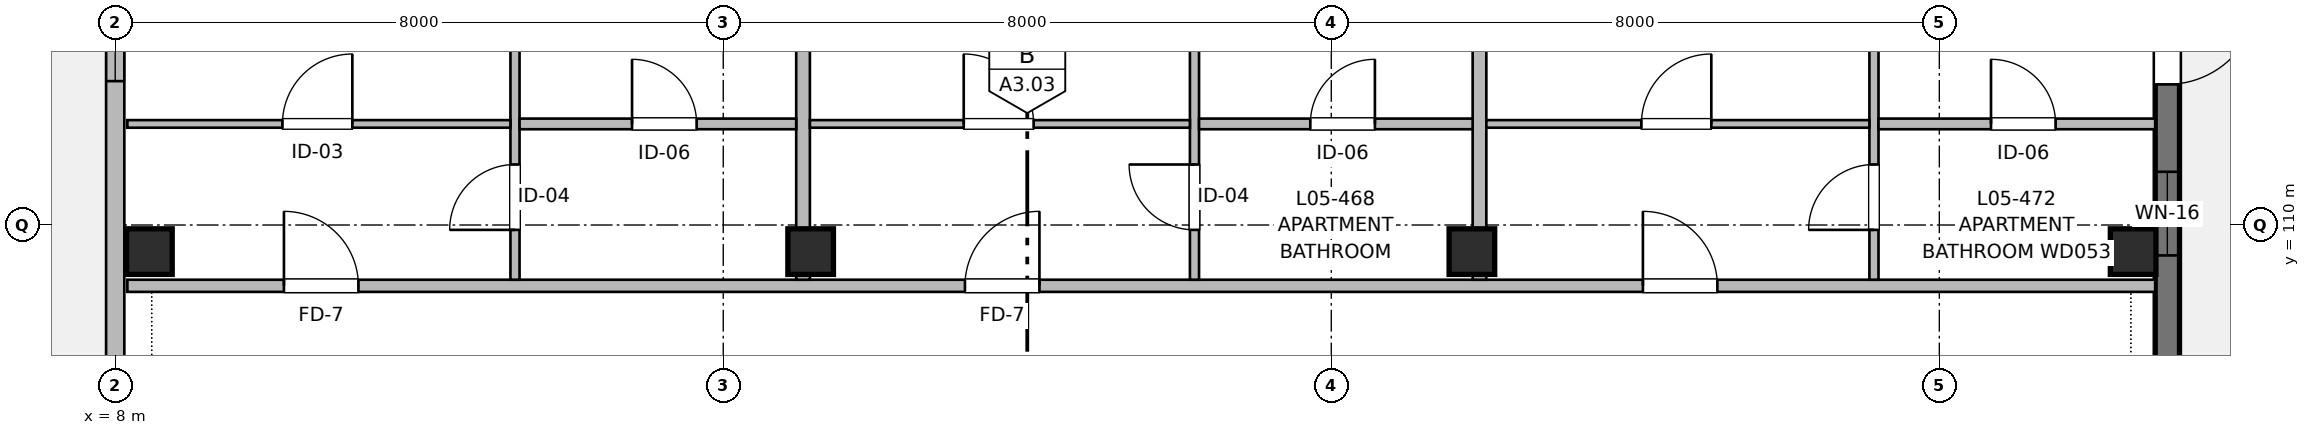
"""IFC4 building model, lengths in metres.
Left out: names, types, materials, properties, quantities, classifications, styles, units other than length and angle.
Written with IfcOpenShell. Run it as: python <this file> out.ifc"""

import sys

from ifc_helpers import new_model, si_unit, direction, frame, frame_2d, origin, origin_2d, place, context, subcontext, project, spatial, rectangle, extrude, element, fill, save


model = new_model("IFC4")
c1 = context("Model", 3, precision=1e-05, world=origin(), true_north=direction((0.0, 1.0)))
c2 = subcontext(c1, "Body", "Model", "MODEL_VIEW")
j1 = project(units=[si_unit("LENGTHUNIT", "METRE"), si_unit("PLANEANGLEUNIT", "RADIAN")], contexts=[c1])
p1 = place(None, origin())
s1 = spatial("IfcSite", under=j1, at=p1, CompositionType="ELEMENT")
p2 = place(p1, origin())
s2 = spatial("IfcBuilding", under=s1, at=p2, CompositionType="ELEMENT")
p3 = place(p2, frame((0.0, 0.0, 16.96)))
s3 = spatial("IfcBuildingStorey", under=s2, at=p3, CompositionType="ELEMENT", Elevation=16.96)
for number, where, z_axis, x_axis in (
    (1, (8.45, 109.65, 0.0), (0.0, 0.0, 1.0), (1.0, 0.0, 0.0)),
    (2, (17.15, 109.65, 0.0), (0.0, 0.0, 1.0), (1.0, 0.0, 0.0)),
    (3, (25.85, 109.65, 0.0), (0.0, 0.0, 1.0), (1.0, 0.0, 0.0)),
    (4, (34.55, 109.65, 0.0), (0.0, 0.0, 1.0), (1.0, 0.0, 0.0)),
):
    element("IfcColumn", number, at=place(p3, frame(where, z_axis=z_axis, x_axis=x_axis)), inside=s3, PredefinedType="COLUMN", context=c2, shape_type="SweptSolid", body=[
        extrude(rectangle(XDim=0.6, YDim=0.6, at=origin_2d()), origin(), (0.0, 0.0, 1.0), 3.2),
    ])
p4 = place(p3, frame((35.0, 116.0, 0.0), z_axis=(0.0, 0.0, 1.0), x_axis=(0.0, -1.0, 0.0)))
e5 = element("IfcWall", 5, at=p4, inside=s3, PredefinedType="SHEAR", context=c2, shape_type="SweptSolid", body=[
    extrude(rectangle(XDim=16.0, YDim=0.32, at=frame_2d((8.0, 0.0))), origin(), (0.0, 0.0, 1.0), 2.98),
])
p5 = place(p4, frame((2.95, 0.0, 0.0)))
e6 = element("IfcOpeningElement", 6, at=p5, cuts=e5, PredefinedType="OPENING", context=c2, shape_type="SweptSolid", body=[
    extrude(rectangle(XDim=1.2, YDim=2.2, at=frame_2d((0.6, 1.1))), frame((0.0, 0.17, 0.0), z_axis=(0.0, -1.0, 0.0), x_axis=(1.0, 0.0, 0.0)), (0.0, 0.0, 1.0), 0.34),
])
p6 = place(p4, frame((5.3, 0.0, 0.62)))
e7 = element("IfcOpeningElement", 7, at=p6, cuts=e5, PredefinedType="OPENING", context=c2, shape_type="SweptSolid", body=[
    extrude(rectangle(XDim=1.1, YDim=1.6, at=frame_2d((0.55, 0.8))), frame((0.0, 0.17, 0.0), z_axis=(0.0, -1.0, 0.0), x_axis=(1.0, 0.0, 0.0)), (0.0, 0.0, 1.0), 0.34),
])
p7 = place(p4, frame((10.875, 0.0, 0.72)))
e8 = element("IfcOpeningElement", 8, at=p7, cuts=e5, PredefinedType="OPENING", context=c2, shape_type="SweptSolid", body=[
    extrude(rectangle(XDim=2.25, YDim=1.5, at=frame_2d((1.125, 0.75))), frame((0.0, 0.17, 0.0), z_axis=(0.0, -1.0, 0.0), x_axis=(1.0, 0.0, 0.0)), (0.0, 0.0, 1.0), 0.34),
])
p8 = place(p3, frame((8.0, 59.2, 0.0), z_axis=(0.0, 0.0, 1.0), x_axis=(0.0, 1.0, 0.0)))
e9 = element("IfcWall", 9, at=p8, inside=s3, PredefinedType="SOLIDWALL", context=c2, shape_type="SweptSolid", body=[
    extrude(rectangle(XDim=56.8, YDim=0.24, at=frame_2d((28.4, 0.0))), origin(), (0.0, 0.0, 1.0), 2.98),
])
p9 = place(p8, frame((2.657, 0.0, 0.0)))
e10 = element("IfcOpeningElement", 10, at=p9, cuts=e9, PredefinedType="OPENING", context=c2, shape_type="SweptSolid", body=[
    extrude(rectangle(XDim=1.2, YDim=2.2, at=frame_2d((0.6, 1.1))), frame((0.0, 0.13, 0.0), z_axis=(0.0, -1.0, 0.0), x_axis=(1.0, 0.0, 0.0)), (0.0, 0.0, 1.0), 0.26),
])
p10 = place(p8, frame((5.357, 0.0, 0.62)))
e11 = element("IfcOpeningElement", 11, at=p10, cuts=e9, PredefinedType="OPENING", context=c2, shape_type="SweptSolid", body=[
    extrude(rectangle(XDim=1.1, YDim=1.6, at=frame_2d((0.55, 0.8))), frame((0.0, 0.13, 0.0), z_axis=(0.0, -1.0, 0.0), x_axis=(1.0, 0.0, 0.0)), (0.0, 0.0, 1.0), 0.26),
])
p11 = place(p8, frame((11.046, 0.0, 0.72)))
e12 = element("IfcOpeningElement", 12, at=p11, cuts=e9, PredefinedType="OPENING", context=c2, shape_type="SweptSolid", body=[
    extrude(rectangle(XDim=2.25, YDim=1.5, at=frame_2d((1.125, 0.75))), frame((0.0, 0.13, 0.0), z_axis=(0.0, -1.0, 0.0), x_axis=(1.0, 0.0, 0.0)), (0.0, 0.0, 1.0), 0.26),
])
p12 = place(p8, frame((19.311, 0.0, 0.9)))
e13 = element("IfcOpeningElement", 13, at=p12, cuts=e9, PredefinedType="OPENING", context=c2, shape_type="SweptSolid", body=[
    extrude(rectangle(XDim=1.05, YDim=1.15, at=frame_2d((0.525, 0.575))), frame((0.0, 0.13, 0.0), z_axis=(0.0, -1.0, 0.0), x_axis=(1.0, 0.0, 0.0)), (0.0, 0.0, 1.0), 0.26),
])
p13 = place(p8, frame((27.8, 0.0, 0.9)))
e14 = element("IfcOpeningElement", 14, at=p13, cuts=e9, PredefinedType="OPENING", context=c2, shape_type="SweptSolid", body=[
    extrude(rectangle(XDim=1.2, YDim=1.05, at=frame_2d((0.6, 0.525))), frame((0.0, 0.13, 0.0), z_axis=(0.0, -1.0, 0.0), x_axis=(1.0, 0.0, 0.0)), (0.0, 0.0, 1.0), 0.26),
])
p14 = place(p8, frame((36.189, 0.0, 0.9)))
e15 = element("IfcOpeningElement", 15, at=p14, cuts=e9, PredefinedType="OPENING", context=c2, shape_type="SweptSolid", body=[
    extrude(rectangle(XDim=0.65, YDim=0.95, at=frame_2d((0.325, 0.475))), frame((0.0, 0.13, 0.0), z_axis=(0.0, -1.0, 0.0), x_axis=(1.0, 0.0, 0.0)), (0.0, 0.0, 1.0), 0.26),
])
p15 = place(p8, frame((43.629, 0.0, 0.62)))
e16 = element("IfcOpeningElement", 16, at=p15, cuts=e9, PredefinedType="OPENING", context=c2, shape_type="SweptSolid", body=[
    extrude(rectangle(XDim=1.1, YDim=1.6, at=frame_2d((0.55, 0.8))), frame((0.0, 0.13, 0.0), z_axis=(0.0, -1.0, 0.0), x_axis=(1.0, 0.0, 0.0)), (0.0, 0.0, 1.0), 0.26),
])
p16 = place(p8, frame((52.693, 0.0, 0.47)))
e17 = element("IfcOpeningElement", 17, at=p16, cuts=e9, PredefinedType="OPENING", context=c2, shape_type="SweptSolid", body=[
    extrude(rectangle(XDim=2.7, YDim=1.75, at=frame_2d((1.35, 0.875))), frame((0.0, 0.13, 0.0), z_axis=(0.0, -1.0, 0.0), x_axis=(1.0, 0.0, 0.0)), (0.0, 0.0, 1.0), 0.26),
])
p17 = place(p3, frame((8.16, 109.2, 0.0), z_axis=(0.0, 0.0, 1.0), x_axis=(1.0, 0.0, 0.0)))
e18 = element("IfcWall", 18, at=p17, inside=s3, PredefinedType="PARTITIONING", context=c2, shape_type="SweptSolid", body=[
    extrude(rectangle(XDim=26.68, YDim=0.16, at=frame_2d((13.34, 0.0))), origin(), (0.0, 0.0, 1.0), 2.935),
])
p18 = place(p17, frame((2.06, 0.0, 0.0)))
e19 = element("IfcOpeningElement", 19, at=p18, cuts=e18, PredefinedType="OPENING", context=c2, shape_type="SweptSolid", body=[
    extrude(rectangle(XDim=0.98, YDim=2.15, at=frame_2d((0.49, 1.075))), frame((0.0, 0.09, 0.0), z_axis=(0.0, -1.0, 0.0), x_axis=(1.0, 0.0, 0.0)), (0.0, 0.0, 1.0), 0.18),
])
p19 = place(p17, frame((11.02, 0.0, 0.0)))
e20 = element("IfcOpeningElement", 20, at=p19, cuts=e18, PredefinedType="OPENING", context=c2, shape_type="SweptSolid", body=[
    extrude(rectangle(XDim=0.98, YDim=2.15, at=frame_2d((0.49, 1.075))), frame((0.0, 0.09, 0.0), z_axis=(0.0, -1.0, 0.0), x_axis=(1.0, 0.0, 0.0)), (0.0, 0.0, 1.0), 0.18),
])
p20 = place(p17, frame((19.94, 0.0, 0.0)))
e21 = element("IfcOpeningElement", 21, at=p20, cuts=e18, PredefinedType="OPENING", context=c2, shape_type="SweptSolid", body=[
    extrude(rectangle(XDim=0.98, YDim=2.15, at=frame_2d((0.49, 1.075))), frame((0.0, 0.09, 0.0), z_axis=(0.0, -1.0, 0.0), x_axis=(1.0, 0.0, 0.0)), (0.0, 0.0, 1.0), 0.18),
])
for number, where, z_axis, x_axis in (
    (22, (17.05, 109.28, 0.0), (0.0, 0.0, 1.0), (0.0, 1.0, 0.0)),
    (23, (25.95, 109.28, 0.0), (0.0, 0.0, 1.0), (0.0, 1.0, 0.0)),
):
    element("IfcWall", number, at=place(p3, frame(where, z_axis=z_axis, x_axis=x_axis)), inside=s3, PredefinedType="PARTITIONING", context=c2, shape_type="SweptSolid", body=[
        extrude(rectangle(XDim=6.6, YDim=0.18, at=frame_2d((3.3, 0.0))), origin(), (0.0, 0.0, 1.0), 2.68),
    ])
p21 = place(p3, frame((13.26, 109.28, 0.0), z_axis=(0.0, 0.0, 1.0), x_axis=(0.0, 1.0, 0.0)))
e24 = element("IfcWall", 24, at=p21, inside=s3, PredefinedType="PARTITIONING", context=c2, shape_type="SweptSolid", body=[
    extrude(rectangle(XDim=6.6, YDim=0.12, at=frame_2d((3.3, 0.0))), origin(), (0.0, 0.0, 1.0), 2.935),
])
p22 = place(p21, frame((0.656, 0.0, 0.0)))
e25 = element("IfcOpeningElement", 25, at=p22, cuts=e24, PredefinedType="OPENING", context=c2, shape_type="SweptSolid", body=[
    extrude(rectangle(XDim=0.86, YDim=2.1, at=frame_2d((0.43, 1.05))), frame((0.0, 0.07, 0.0), z_axis=(0.0, -1.0, 0.0), x_axis=(1.0, 0.0, 0.0)), (0.0, 0.0, 1.0), 0.14),
])
p23 = place(p21, frame((4.097, 0.0, 0.0)))
e26 = element("IfcOpeningElement", 26, at=p23, cuts=e24, PredefinedType="OPENING", context=c2, shape_type="SweptSolid", body=[
    extrude(rectangle(XDim=0.9, YDim=2.1, at=frame_2d((0.45, 1.05))), frame((0.0, 0.07, 0.0), z_axis=(0.0, -1.0, 0.0), x_axis=(1.0, 0.0, 0.0)), (0.0, 0.0, 1.0), 0.14),
])
p24 = place(p3, frame((13.32, 111.33, 0.0), z_axis=(0.0, 0.0, 1.0), x_axis=(1.0, 0.0, 0.0)))
e27 = element("IfcWall", 27, at=p24, inside=s3, PredefinedType="PARTITIONING", context=c2, shape_type="SweptSolid", body=[
    extrude(rectangle(XDim=3.64, YDim=0.14, at=frame_2d((1.82, 0.0))), origin(), (0.0, 0.0, 1.0), 2.935),
])
p25 = place(p24, frame((1.48, 0.0, 0.0)))
e28 = element("IfcOpeningElement", 28, at=p25, cuts=e27, PredefinedType="OPENING", context=c2, shape_type="SweptSolid", body=[
    extrude(rectangle(XDim=0.85, YDim=2.05, at=frame_2d((0.425, 1.025))), frame((0.0, 0.08, 0.0), z_axis=(0.0, -1.0, 0.0), x_axis=(1.0, 0.0, 0.0)), (0.0, 0.0, 1.0), 0.16),
])
p26 = place(p3, frame((8.16, 111.33, 0.0), z_axis=(0.0, 0.0, 1.0), x_axis=(1.0, 0.0, 0.0)))
e29 = element("IfcWall", 29, at=p26, inside=s3, PredefinedType="PARTITIONING", context=c2, shape_type="SweptSolid", body=[
    extrude(rectangle(XDim=5.04, YDim=0.1, at=frame_2d((2.52, 0.0))), origin(), (0.0, 0.0, 1.0), 2.935),
])
p27 = place(p26, frame((2.04, 0.0, 0.0)))
e30 = element("IfcOpeningElement", 30, at=p27, cuts=e29, PredefinedType="OPENING", context=c2, shape_type="SweptSolid", body=[
    extrude(rectangle(XDim=0.92, YDim=2.1, at=frame_2d((0.46, 1.05))), frame((0.0, 0.06, 0.0), z_axis=(0.0, -1.0, 0.0), x_axis=(1.0, 0.0, 0.0)), (0.0, 0.0, 1.0), 0.12),
])
p28 = place(p3, frame((22.2, 109.28, 0.0), z_axis=(0.0, 0.0, 1.0), x_axis=(0.0, 1.0, 0.0)))
e31 = element("IfcWall", 31, at=p28, inside=s3, PredefinedType="PARTITIONING", context=c2, shape_type="SweptSolid", body=[
    extrude(rectangle(XDim=6.6, YDim=0.12, at=frame_2d((3.3, 0.0))), origin(), (0.0, 0.0, 1.0), 2.935),
])
p29 = place(p28, frame((0.656, 0.0, 0.0)))
e32 = element("IfcOpeningElement", 32, at=p29, cuts=e31, PredefinedType="OPENING", context=c2, shape_type="SweptSolid", body=[
    extrude(rectangle(XDim=0.86, YDim=2.1, at=frame_2d((0.43, 1.05))), frame((0.0, 0.07, 0.0), z_axis=(0.0, -1.0, 0.0), x_axis=(1.0, 0.0, 0.0)), (0.0, 0.0, 1.0), 0.14),
])
p30 = place(p28, frame((4.097, 0.0, 0.0)))
e33 = element("IfcOpeningElement", 33, at=p30, cuts=e31, PredefinedType="OPENING", context=c2, shape_type="SweptSolid", body=[
    extrude(rectangle(XDim=0.9, YDim=2.1, at=frame_2d((0.45, 1.05))), frame((0.0, 0.07, 0.0), z_axis=(0.0, -1.0, 0.0), x_axis=(1.0, 0.0, 0.0)), (0.0, 0.0, 1.0), 0.14),
])
p31 = place(p3, frame((22.26, 111.33, 0.0), z_axis=(0.0, 0.0, 1.0), x_axis=(1.0, 0.0, 0.0)))
e34 = element("IfcWall", 34, at=p31, inside=s3, PredefinedType="PARTITIONING", context=c2, shape_type="SweptSolid", body=[
    extrude(rectangle(XDim=3.6, YDim=0.14, at=frame_2d((1.8, 0.0))), origin(), (0.0, 0.0, 1.0), 2.935),
])
p32 = place(p31, frame((1.464, 0.0, 0.0)))
e35 = element("IfcOpeningElement", 35, at=p32, cuts=e34, PredefinedType="OPENING", context=c2, shape_type="SweptSolid", body=[
    extrude(rectangle(XDim=0.85, YDim=2.05, at=frame_2d((0.425, 1.025))), frame((0.0, 0.08, 0.0), z_axis=(0.0, -1.0, 0.0), x_axis=(1.0, 0.0, 0.0)), (0.0, 0.0, 1.0), 0.16),
])
p33 = place(p3, frame((17.14, 111.33, 0.0), z_axis=(0.0, 0.0, 1.0), x_axis=(1.0, 0.0, 0.0)))
e36 = element("IfcWall", 36, at=p33, inside=s3, PredefinedType="PARTITIONING", context=c2, shape_type="SweptSolid", body=[
    extrude(rectangle(XDim=5.0, YDim=0.1, at=frame_2d((2.5, 0.0))), origin(), (0.0, 0.0, 1.0), 2.935),
])
p34 = place(p33, frame((2.024, 0.0, 0.0)))
e37 = element("IfcOpeningElement", 37, at=p34, cuts=e36, PredefinedType="OPENING", context=c2, shape_type="SweptSolid", body=[
    extrude(rectangle(XDim=0.92, YDim=2.1, at=frame_2d((0.46, 1.05))), frame((0.0, 0.06, 0.0), z_axis=(0.0, -1.0, 0.0), x_axis=(1.0, 0.0, 0.0)), (0.0, 0.0, 1.0), 0.12),
])
p35 = place(p3, frame((31.14, 109.28, 0.0), z_axis=(0.0, 0.0, 1.0), x_axis=(0.0, 1.0, 0.0)))
e38 = element("IfcWall", 38, at=p35, inside=s3, PredefinedType="PARTITIONING", context=c2, shape_type="SweptSolid", body=[
    extrude(rectangle(XDim=6.6, YDim=0.12, at=frame_2d((3.3, 0.0))), origin(), (0.0, 0.0, 1.0), 2.935),
])
p36 = place(p35, frame((0.656, 0.0, 0.0)))
e39 = element("IfcOpeningElement", 39, at=p36, cuts=e38, PredefinedType="OPENING", context=c2, shape_type="SweptSolid", body=[
    extrude(rectangle(XDim=0.86, YDim=2.1, at=frame_2d((0.43, 1.05))), frame((0.0, 0.07, 0.0), z_axis=(0.0, -1.0, 0.0), x_axis=(1.0, 0.0, 0.0)), (0.0, 0.0, 1.0), 0.14),
])
p37 = place(p35, frame((4.097, 0.0, 0.0)))
e40 = element("IfcOpeningElement", 40, at=p37, cuts=e38, PredefinedType="OPENING", context=c2, shape_type="SweptSolid", body=[
    extrude(rectangle(XDim=0.9, YDim=2.1, at=frame_2d((0.45, 1.05))), frame((0.0, 0.07, 0.0), z_axis=(0.0, -1.0, 0.0), x_axis=(1.0, 0.0, 0.0)), (0.0, 0.0, 1.0), 0.14),
])
p38 = place(p3, frame((31.2, 111.33, 0.0), z_axis=(0.0, 0.0, 1.0), x_axis=(1.0, 0.0, 0.0)))
e41 = element("IfcWall", 41, at=p38, inside=s3, PredefinedType="PARTITIONING", context=c2, shape_type="SweptSolid", body=[
    extrude(rectangle(XDim=3.64, YDim=0.14, at=frame_2d((1.82, 0.0))), origin(), (0.0, 0.0, 1.0), 2.935),
])
p39 = place(p38, frame((1.48, 0.0, 0.0)))
e42 = element("IfcOpeningElement", 42, at=p39, cuts=e41, PredefinedType="OPENING", context=c2, shape_type="SweptSolid", body=[
    extrude(rectangle(XDim=0.85, YDim=2.05, at=frame_2d((0.425, 1.025))), frame((0.0, 0.08, 0.0), z_axis=(0.0, -1.0, 0.0), x_axis=(1.0, 0.0, 0.0)), (0.0, 0.0, 1.0), 0.16),
])
p40 = place(p3, frame((26.04, 111.33, 0.0), z_axis=(0.0, 0.0, 1.0), x_axis=(1.0, 0.0, 0.0)))
e43 = element("IfcWall", 43, at=p40, inside=s3, PredefinedType="PARTITIONING", context=c2, shape_type="SweptSolid", body=[
    extrude(rectangle(XDim=5.04, YDim=0.1, at=frame_2d((2.52, 0.0))), origin(), (0.0, 0.0, 1.0), 2.935),
])
p41 = place(p40, frame((2.04, 0.0, 0.0)))
e44 = element("IfcOpeningElement", 44, at=p41, cuts=e43, PredefinedType="OPENING", context=c2, shape_type="SweptSolid", body=[
    extrude(rectangle(XDim=0.92, YDim=2.1, at=frame_2d((0.46, 1.05))), frame((0.0, 0.06, 0.0), z_axis=(0.0, -1.0, 0.0), x_axis=(1.0, 0.0, 0.0)), (0.0, 0.0, 1.0), 0.12),
])
p42 = place(p5, origin())
e45 = element("IfcDoor", 45, at=p42, inside=s3, OperationType="SINGLE_SWING_LEFT", PredefinedType="DOOR", context=c2, shape_type="SweptSolid", body=[
    extrude(rectangle(XDim=1.2, YDim=2.2, at=frame_2d((0.6, 1.1))), frame((0.0, 0.025, 0.0), z_axis=(0.0, -1.0, 0.0), x_axis=(1.0, 0.0, 0.0)), (0.0, 0.0, 1.0), 0.05),
])
fill(e6, e45)
p43 = place(p6, origin())
e46 = element("IfcWindow", 46, at=p43, inside=s3, PartitioningType="SINGLE_PANEL", PredefinedType="WINDOW", context=c2, shape_type="SweptSolid", body=[
    extrude(rectangle(XDim=1.1, YDim=1.6, at=frame_2d((0.55, 0.8))), frame((0.0, 0.03, 0.0), z_axis=(0.0, -1.0, 0.0), x_axis=(1.0, 0.0, 0.0)), (0.0, 0.0, 1.0), 0.06),
])
fill(e7, e46)
p44 = place(p16, origin())
e47 = element("IfcWindow", 47, at=p44, inside=s3, PartitioningType="SINGLE_PANEL", PredefinedType="WINDOW", context=c2, shape_type="SweptSolid", body=[
    extrude(rectangle(XDim=2.7, YDim=1.75, at=frame_2d((1.35, 0.875))), frame((0.0, 0.03, 0.0), z_axis=(0.0, -1.0, 0.0), x_axis=(1.0, 0.0, 0.0)), (0.0, 0.0, 1.0), 0.06),
])
fill(e17, e47)
p45 = place(p18, origin())
e48 = element("IfcDoor", 48, at=p45, inside=s3, OperationType="SINGLE_SWING_LEFT", PredefinedType="DOOR", context=c2, shape_type="SweptSolid", body=[
    extrude(rectangle(XDim=0.98, YDim=2.15, at=frame_2d((0.49, 1.075))), frame((0.0, 0.025, 0.0), z_axis=(0.0, -1.0, 0.0), x_axis=(1.0, 0.0, 0.0)), (0.0, 0.0, 1.0), 0.05),
])
fill(e19, e48)
p46 = place(p27, origin())
e49 = element("IfcDoor", 49, at=p46, inside=s3, OperationType="SINGLE_SWING_RIGHT", PredefinedType="DOOR", context=c2, shape_type="SweptSolid", body=[
    extrude(rectangle(XDim=0.92, YDim=2.1, at=frame_2d((0.46, 1.05))), frame((0.0, 0.025, 0.0), z_axis=(0.0, -1.0, 0.0), x_axis=(1.0, 0.0, 0.0)), (0.0, 0.0, 1.0), 0.05),
])
fill(e30, e49)
p47 = place(p22, origin())
e50 = element("IfcDoor", 50, at=p47, inside=s3, OperationType="SINGLE_SWING_LEFT", PredefinedType="DOOR", context=c2, shape_type="SweptSolid", body=[
    extrude(rectangle(XDim=0.86, YDim=2.1, at=frame_2d((0.43, 1.05))), frame((0.0, 0.025, 0.0), z_axis=(0.0, -1.0, 0.0), x_axis=(1.0, 0.0, 0.0)), (0.0, 0.0, 1.0), 0.05),
])
fill(e25, e50)
p48 = place(p25, origin())
e51 = element("IfcDoor", 51, at=p48, inside=s3, OperationType="SINGLE_SWING_LEFT", PredefinedType="DOOR", context=c2, shape_type="SweptSolid", body=[
    extrude(rectangle(XDim=0.85, YDim=2.05, at=frame_2d((0.425, 1.025))), frame((0.0, 0.025, 0.0), z_axis=(0.0, -1.0, 0.0), x_axis=(1.0, 0.0, 0.0)), (0.0, 0.0, 1.0), 0.05),
])
fill(e28, e51)
p49 = place(p19, origin())
e52 = element("IfcDoor", 52, at=p49, inside=s3, OperationType="SINGLE_SWING_RIGHT", PredefinedType="DOOR", context=c2, shape_type="SweptSolid", body=[
    extrude(rectangle(XDim=0.98, YDim=2.15, at=frame_2d((0.49, 1.075))), frame((0.0, 0.025, 0.0), z_axis=(0.0, -1.0, 0.0), x_axis=(1.0, 0.0, 0.0)), (0.0, 0.0, 1.0), 0.05),
])
fill(e20, e52)
p50 = place(p34, origin())
e53 = element("IfcDoor", 53, at=p50, inside=s3, OperationType="SINGLE_SWING_LEFT", PredefinedType="DOOR", context=c2, shape_type="SweptSolid", body=[
    extrude(rectangle(XDim=0.92, YDim=2.1, at=frame_2d((0.46, 1.05))), frame((0.0, 0.025, 0.0), z_axis=(0.0, -1.0, 0.0), x_axis=(1.0, 0.0, 0.0)), (0.0, 0.0, 1.0), 0.05),
])
fill(e37, e53)
p51 = place(p29, origin())
e54 = element("IfcDoor", 54, at=p51, inside=s3, OperationType="SINGLE_SWING_RIGHT", PredefinedType="DOOR", context=c2, shape_type="SweptSolid", body=[
    extrude(rectangle(XDim=0.86, YDim=2.1, at=frame_2d((0.43, 1.05))), frame((0.0, 0.025, 0.0), z_axis=(0.0, -1.0, 0.0), x_axis=(1.0, 0.0, 0.0)), (0.0, 0.0, 1.0), 0.05),
])
fill(e32, e54)
p52 = place(p32, origin())
e55 = element("IfcDoor", 55, at=p52, inside=s3, OperationType="SINGLE_SWING_RIGHT", PredefinedType="DOOR", context=c2, shape_type="SweptSolid", body=[
    extrude(rectangle(XDim=0.85, YDim=2.05, at=frame_2d((0.425, 1.025))), frame((0.0, 0.025, 0.0), z_axis=(0.0, -1.0, 0.0), x_axis=(1.0, 0.0, 0.0)), (0.0, 0.0, 1.0), 0.05),
])
fill(e35, e55)
p53 = place(p20, origin())
e56 = element("IfcDoor", 56, at=p53, inside=s3, OperationType="SINGLE_SWING_LEFT", PredefinedType="DOOR", context=c2, shape_type="SweptSolid", body=[
    extrude(rectangle(XDim=0.98, YDim=2.15, at=frame_2d((0.49, 1.075))), frame((0.0, 0.025, 0.0), z_axis=(0.0, -1.0, 0.0), x_axis=(1.0, 0.0, 0.0)), (0.0, 0.0, 1.0), 0.05),
])
fill(e21, e56)
p54 = place(p41, origin())
e57 = element("IfcDoor", 57, at=p54, inside=s3, OperationType="SINGLE_SWING_RIGHT", PredefinedType="DOOR", context=c2, shape_type="SweptSolid", body=[
    extrude(rectangle(XDim=0.92, YDim=2.1, at=frame_2d((0.46, 1.05))), frame((0.0, 0.025, 0.0), z_axis=(0.0, -1.0, 0.0), x_axis=(1.0, 0.0, 0.0)), (0.0, 0.0, 1.0), 0.05),
])
fill(e44, e57)
p55 = place(p36, origin())
e58 = element("IfcDoor", 58, at=p55, inside=s3, OperationType="SINGLE_SWING_LEFT", PredefinedType="DOOR", context=c2, shape_type="SweptSolid", body=[
    extrude(rectangle(XDim=0.86, YDim=2.1, at=frame_2d((0.43, 1.05))), frame((0.0, 0.025, 0.0), z_axis=(0.0, -1.0, 0.0), x_axis=(1.0, 0.0, 0.0)), (0.0, 0.0, 1.0), 0.05),
])
fill(e39, e58)
p56 = place(p39, origin())
e59 = element("IfcDoor", 59, at=p56, inside=s3, OperationType="SINGLE_SWING_LEFT", PredefinedType="DOOR", context=c2, shape_type="SweptSolid", body=[
    extrude(rectangle(XDim=0.85, YDim=2.05, at=frame_2d((0.425, 1.025))), frame((0.0, 0.025, 0.0), z_axis=(0.0, -1.0, 0.0), x_axis=(1.0, 0.0, 0.0)), (0.0, 0.0, 1.0), 0.05),
])
fill(e42, e59)
save(model, sys.argv[1])
